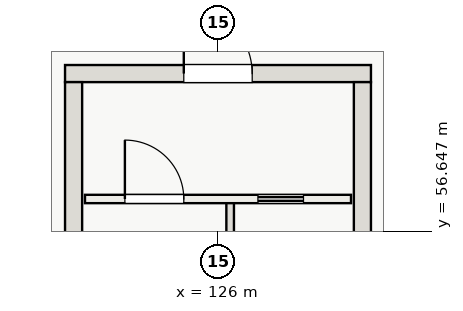
"""IFC4 building model, lengths in metres.
Left out: names, types, materials, properties, quantities, classifications, styles, units other than length and angle.
Written with IfcOpenShell. Run it as: python <this file> out.ifc"""

import sys

from ifc_helpers import new_model, si_unit, direction, frame, frame_2d, origin, place, context, subcontext, project, spatial, rectangle, extrude, element, fill, save


model = new_model("IFC4")
c1 = context("Model", 3, precision=1e-05, world=origin(), true_north=direction((0.0, 1.0)))
c2 = subcontext(c1, "Body", "Model", "MODEL_VIEW")
j1 = project(units=[si_unit("LENGTHUNIT", "METRE"), si_unit("PLANEANGLEUNIT", "RADIAN")], contexts=[c1])
p1 = place(None, origin())
s1 = spatial("IfcSite", under=j1, at=p1, CompositionType="ELEMENT")
p2 = place(p1, origin())
s2 = spatial("IfcBuilding", under=s1, at=p2, CompositionType="ELEMENT")
p3 = place(p2, frame((0.0, 0.0, -4.8)))
s3 = spatial("IfcBuildingStorey", under=s2, at=p3, CompositionType="ELEMENT", Elevation=-4.8)
p4 = place(p3, frame((121.975, 60.8, -0.45), z_axis=(0.0, 0.0, 1.0), x_axis=(1.0, 0.0, 0.0)))
e1 = element("IfcWall", 1, at=p4, inside=s3, PredefinedType="SHEAR", context=c2, shape_type="SweptSolid", body=[
    extrude(rectangle(XDim=8.05, YDim=0.45, at=frame_2d((4.025, 0.0))), origin(), (0.0, 0.0, 1.0), 5.25),
])
p5 = place(p4, frame((3.125, 0.0, 0.45)))
e2 = element("IfcOpeningElement", 2, at=p5, cuts=e1, PredefinedType="OPENING", context=c2, shape_type="SweptSolid", body=[
    extrude(rectangle(XDim=1.8, YDim=2.3, at=frame_2d((0.9, 1.15))), frame((0.0, 0.235, 0.0), z_axis=(0.0, -1.0, 0.0), x_axis=(1.0, 0.0, 0.0)), (0.0, 0.0, 1.0), 0.47),
])
for number, where, z_axis, x_axis in (
    (3, (122.2, 49.425, -0.45), (0.0, 0.0, 1.0), (0.0, 1.0, 0.0)),
    (4, (129.8, 49.425, -0.45), (0.0, 0.0, 1.0), (0.0, 1.0, 0.0)),
):
    element("IfcWall", number, at=place(p3, frame(where, z_axis=z_axis, x_axis=x_axis)), inside=s3, PredefinedType="SHEAR", context=c2, shape_type="SweptSolid", body=[
        extrude(rectangle(XDim=11.15, YDim=0.45, at=frame_2d((5.575, 0.0))), origin(), (0.0, 0.0, 1.0), 5.25),
    ])
p6 = place(p3, frame((126.32, 49.45, -0.45), z_axis=(0.0, 0.0, 1.0), x_axis=(0.0, 1.0, 0.0)))
e5 = element("IfcWall", 5, at=p6, inside=s3, PredefinedType="SOLIDWALL", context=c2, shape_type="SweptSolid", body=[
    extrude(rectangle(XDim=8.0, YDim=0.2, at=frame_2d((4.0, 0.0))), origin(), (0.0, 0.0, 1.0), 5.25),
])
p7 = place(p3, frame((122.5, 57.5, 0.0), z_axis=(0.0, 0.0, 1.0), x_axis=(1.0, 0.0, 0.0)))
e6 = element("IfcWall", 6, at=p7, inside=s3, PredefinedType="SOLIDWALL", context=c2, shape_type="SweptSolid", body=[
    extrude(rectangle(XDim=7.0, YDim=0.22, at=frame_2d((3.5, 0.0))), origin(), (0.0, 0.0, 1.0), 4.4),
])
p8 = place(p7, frame((1.05, 0.0, 0.0)))
e7 = element("IfcOpeningElement", 7, at=p8, cuts=e6, PredefinedType="OPENING", context=c2, shape_type="SweptSolid", body=[
    extrude(rectangle(XDim=1.55, YDim=2.2, at=frame_2d((0.775, 1.1))), frame((0.0, 0.12, 0.0), z_axis=(0.0, -1.0, 0.0), x_axis=(1.0, 0.0, 0.0)), (0.0, 0.0, 1.0), 0.24),
])
p9 = place(p7, frame((4.55, 0.0, 0.0)))
e8 = element("IfcOpeningElement", 8, at=p9, cuts=e6, PredefinedType="OPENING", context=c2, shape_type="SweptSolid", body=[
    extrude(rectangle(XDim=1.2, YDim=2.2, at=frame_2d((0.6, 1.1))), frame((0.0, 0.12, 0.0), z_axis=(0.0, -1.0, 0.0), x_axis=(1.0, 0.0, 0.0)), (0.0, 0.0, 1.0), 0.24),
])
p10 = place(p8, origin())
e9 = element("IfcDoor", 9, at=p10, inside=s3, OperationType="SINGLE_SWING_LEFT", PredefinedType="DOOR", context=c2, shape_type="SweptSolid", body=[
    extrude(rectangle(XDim=1.55, YDim=2.2, at=frame_2d((0.775, 1.1))), frame((0.0, 0.025, 0.0), z_axis=(0.0, -1.0, 0.0), x_axis=(1.0, 0.0, 0.0)), (0.0, 0.0, 1.0), 0.05),
])
fill(e7, e9)
p11 = place(p9, origin())
e10 = element("IfcDoor", 10, at=p11, inside=s3, OperationType="SLIDING_TO_LEFT", PredefinedType="DOOR", context=c2, shape_type="SweptSolid", body=[
    extrude(rectangle(XDim=1.2, YDim=2.2, at=frame_2d((0.6, 1.1))), frame((0.0, 0.025, 0.0), z_axis=(0.0, -1.0, 0.0), x_axis=(1.0, 0.0, 0.0)), (0.0, 0.0, 1.0), 0.05),
])
fill(e8, e10)
p12 = place(p5, origin())
e11 = element("IfcDoor", 11, at=p12, inside=s3, OperationType="DOUBLE_DOOR_SINGLE_SWING", PredefinedType="DOOR", context=c2, shape_type="SweptSolid", body=[
    extrude(rectangle(XDim=1.8, YDim=2.3, at=frame_2d((0.9, 1.15))), frame((0.0, 0.025, 0.0), z_axis=(0.0, -1.0, 0.0), x_axis=(1.0, 0.0, 0.0)), (0.0, 0.0, 1.0), 0.05),
])
fill(e2, e11)
save(model, sys.argv[1])
